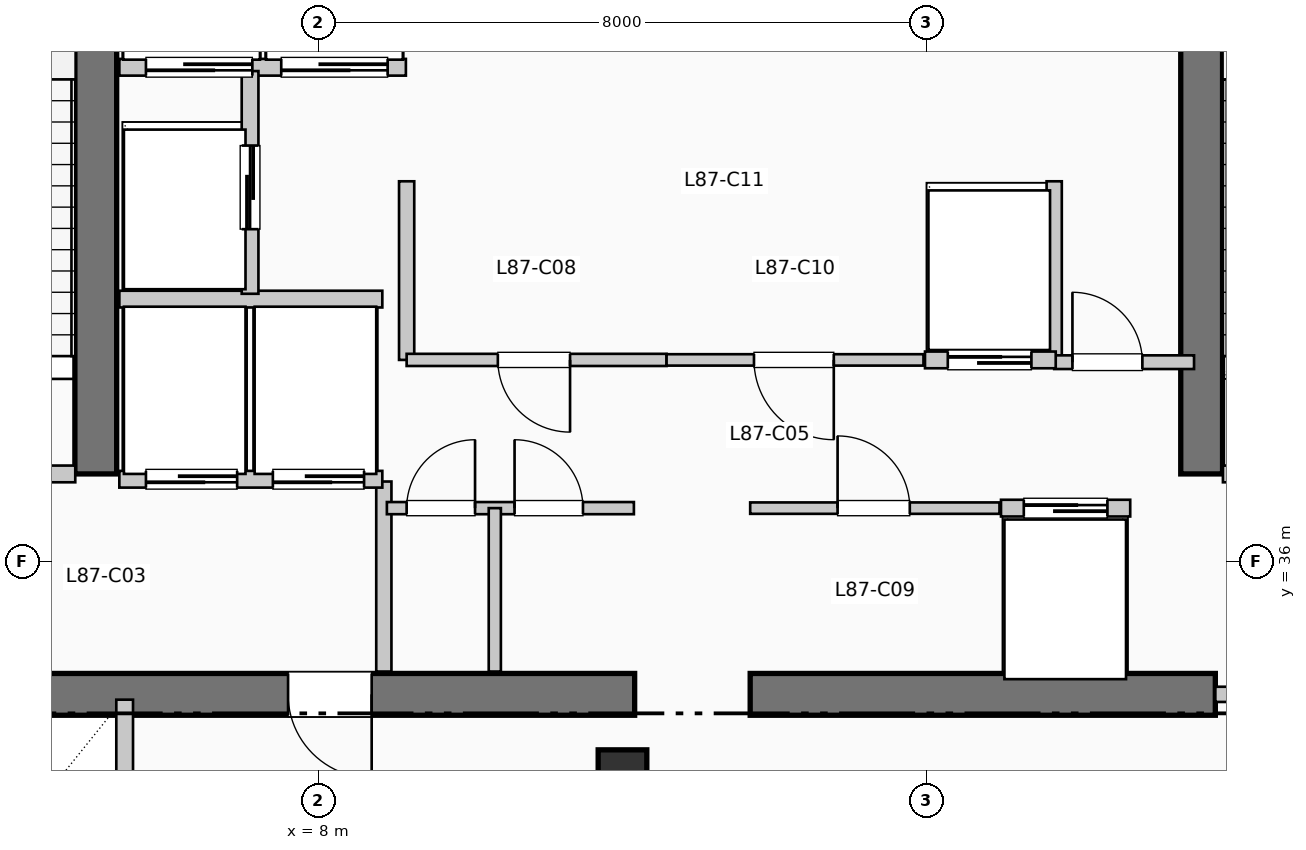
"""IFC4 building model, lengths in metres.
Left out: names, types, materials, properties, quantities, classifications, styles, units other than length and angle.
Written with IfcOpenShell. Run it as: python <this file> out.ifc"""

import sys

from ifc_helpers import new_model, si_unit, direction, frame, frame_2d, origin, origin_2d, place, context, subcontext, project, spatial, rectangle, extrude, element, fill, save


model = new_model("IFC4")
c1 = context("Model", 3, precision=1e-05, world=origin(), true_north=direction((0.0, 1.0)))
c2 = subcontext(c1, "Body", "Model", "MODEL_VIEW")
j1 = project(units=[si_unit("LENGTHUNIT", "METRE"), si_unit("PLANEANGLEUNIT", "RADIAN")], contexts=[c1])
p1 = place(None, origin())
s1 = spatial("IfcSite", under=j1, at=p1, CompositionType="ELEMENT")
p2 = place(p1, origin())
s2 = spatial("IfcBuilding", under=s1, at=p2, CompositionType="ELEMENT")
p3 = place(p2, frame((0.0, 0.0, 356.73)))
s3 = spatial("IfcBuildingStorey", under=s2, at=p3, CompositionType="ELEMENT", Elevation=356.73)
p4 = place(p3, frame((1.45, 34.25, 0.0), z_axis=(0.0, 0.0, 1.0), x_axis=(1.0, 0.0, 0.0)))
e1 = element("IfcWall", 1, at=p4, inside=s3, PredefinedType="SHEAR", context=c2, shape_type="SweptSolid", body=[
    extrude(rectangle(XDim=10.71, YDim=0.55, at=frame_2d((5.355, 0.0))), origin(), (0.0, 0.0, 1.0), 4.62),
])
p5 = place(p4, frame((7.25, 0.0, 0.0), z_axis=(0.0, 0.0, 1.0), x_axis=(-1.0, 0.0, 0.0)))
e2 = element("IfcOpeningElement", 2, at=p5, cuts=e1, PredefinedType="OPENING", context=c2, shape_type="SweptSolid", body=[
    extrude(rectangle(XDim=1.1, YDim=2.15, at=frame_2d((0.55, 1.075))), frame((0.0, 0.285, 0.0), z_axis=(0.0, -1.0, 0.0), x_axis=(1.0, 0.0, 0.0)), (0.0, 0.0, 1.0), 0.57),
])
p6 = place(p3, frame((13.68, 34.25, 0.0), z_axis=(0.0, 0.0, 1.0), x_axis=(1.0, 0.0, 0.0)))
e3 = element("IfcWall", 3, at=p6, inside=s3, PredefinedType="SHEAR", context=c2, shape_type="SweptSolid", body=[
    extrude(rectangle(XDim=6.12, YDim=0.55, at=frame_2d((3.06, 0.0))), origin(), (0.0, 0.0, 1.0), 4.62),
])
for number, where, z_axis, x_axis in (
    (4, (5.07, 37.15, 0.0), (0.0, 0.0, 1.0), (0.0, 1.0, 0.0)),
    (5, (19.62, 37.15, 0.0), (0.0, 0.0, 1.0), (0.0, 1.0, 0.0)),
):
    element("IfcWall", number, at=place(p3, frame(where, z_axis=z_axis, x_axis=x_axis)), inside=s3, PredefinedType="SHEAR", context=c2, shape_type="SweptSolid", body=[
        extrude(rectangle(XDim=7.89, YDim=0.55, at=frame_2d((3.945, 0.0))), origin(), (0.0, 0.0, 1.0), 4.62),
    ])
p7 = place(p3, frame((12.0, 33.2, 0.0), z_axis=(0.0, 0.0, 1.0), x_axis=(1.0, 0.0, 0.0)))
e6 = element("IfcColumn", 6, at=p7, inside=s3, PredefinedType="COLUMN", context=c2, shape_type="SweptSolid", body=[
    extrude(rectangle(XDim=0.64, YDim=0.64, at=origin_2d()), origin(), (0.0, 0.0, 1.0), 4.62),
])
p8 = place(p3, frame((1.65, 37.15, 0.0), z_axis=(0.0, 0.0, 1.0), x_axis=(1.0, 0.0, 0.0)))
e7 = element("IfcWall", 7, at=p8, inside=s3, PredefinedType="PARTITIONING", context=c2, shape_type="SweptSolid", body=[
    extrude(rectangle(XDim=3.15, YDim=0.22, at=frame_2d((1.575, 0.0))), origin(), (0.0, 0.0, 1.0), 4.37),
])
p9 = place(p8, frame((2.05, 0.0, 0.0), z_axis=(0.0, 0.0, 1.0), x_axis=(-1.0, 0.0, 0.0)))
e8 = element("IfcOpeningElement", 8, at=p9, cuts=e7, PredefinedType="OPENING", context=c2, shape_type="SweptSolid", body=[
    extrude(rectangle(XDim=1.05, YDim=2.15, at=frame_2d((0.525, 1.075))), frame((0.0, 0.12, 0.0), z_axis=(0.0, -1.0, 0.0), x_axis=(1.0, 0.0, 0.0)), (0.0, 0.0, 1.0), 0.24),
])
p10 = place(p3, frame((8.86, 34.55, 0.0), z_axis=(0.0, 0.0, 1.0), x_axis=(0.0, 1.0, 0.0)))
e9 = element("IfcWall", 9, at=p10, inside=s3, PredefinedType="PARTITIONING", context=c2, shape_type="SweptSolid", body=[
    extrude(rectangle(XDim=2.5, YDim=0.2, at=frame_2d((1.25, 0.0))), origin(), (0.0, 0.0, 1.0), 4.37),
])
p11 = place(p3, frame((19.9, 37.15, 0.0), z_axis=(0.0, 0.0, 1.0), x_axis=(1.0, 0.0, 0.0)))
e10 = element("IfcWall", 10, at=p11, inside=s3, PredefinedType="PARTITIONING", context=c2, shape_type="SweptSolid", body=[
    extrude(rectangle(XDim=3.15, YDim=0.22, at=frame_2d((1.575, 0.0))), origin(), (0.0, 0.0, 1.0), 4.37),
])
p12 = place(p11, frame((2.05, 0.0, 0.0), z_axis=(0.0, 0.0, 1.0), x_axis=(-1.0, 0.0, 0.0)))
e11 = element("IfcOpeningElement", 11, at=p12, cuts=e10, PredefinedType="OPENING", context=c2, shape_type="SweptSolid", body=[
    extrude(rectangle(XDim=1.05, YDim=2.15, at=frame_2d((0.525, 1.075))), frame((0.0, 0.12, 0.0), z_axis=(0.0, -1.0, 0.0), x_axis=(1.0, 0.0, 0.0)), (0.0, 0.0, 1.0), 0.24),
])
p13 = place(p3, frame((19.8, 34.25, 0.0), z_axis=(0.0, 0.0, 1.0), x_axis=(1.0, 0.0, 0.0)))
e12 = element("IfcWall", 12, at=p13, inside=s3, PredefinedType="PARTITIONING", context=c2, shape_type="SweptSolid", body=[
    extrude(rectangle(XDim=3.25, YDim=0.2, at=frame_2d((1.625, 0.0))), origin(), (0.0, 0.0, 1.0), 4.37),
])
p14 = place(p13, frame((2.15, 0.0, 0.0), z_axis=(0.0, 0.0, 1.0), x_axis=(-1.0, 0.0, 0.0)))
e13 = element("IfcOpeningElement", 13, at=p14, cuts=e12, PredefinedType="OPENING", context=c2, shape_type="SweptSolid", body=[
    extrude(rectangle(XDim=1.1, YDim=2.15, at=frame_2d((0.55, 1.075))), frame((0.0, 0.11, 0.0), z_axis=(0.0, -1.0, 0.0), x_axis=(1.0, 0.0, 0.0)), (0.0, 0.0, 1.0), 0.22),
])
p15 = place(p3, frame((5.38, 37.08, 0.0), z_axis=(0.0, 0.0, 1.0), x_axis=(1.0, 0.0, 0.0)))
e14 = element("IfcWall", 14, at=p15, inside=s3, PredefinedType="PARTITIONING", context=c2, shape_type="SweptSolid", body=[
    extrude(rectangle(XDim=3.46, YDim=0.22, at=frame_2d((1.73, 0.0))), origin(), (0.0, 0.0, 1.0), 4.37),
])
p16 = place(p15, frame((1.55, 0.0, 0.0), z_axis=(0.0, 0.0, 1.0), x_axis=(-1.0, 0.0, 0.0)))
e15 = element("IfcOpeningElement", 15, at=p16, cuts=e14, PredefinedType="OPENING", context=c2, shape_type="SweptSolid", body=[
    extrude(rectangle(XDim=1.2, YDim=2.2, at=frame_2d((0.6, 1.1))), frame((0.0, 0.12, 0.0), z_axis=(0.0, -1.0, 0.0), x_axis=(1.0, 0.0, 0.0)), (0.0, 0.0, 1.0), 0.24),
])
p17 = place(p15, frame((3.22, 0.0, 0.0), z_axis=(0.0, 0.0, 1.0), x_axis=(-1.0, 0.0, 0.0)))
e16 = element("IfcOpeningElement", 16, at=p17, cuts=e14, PredefinedType="OPENING", context=c2, shape_type="SweptSolid", body=[
    extrude(rectangle(XDim=1.2, YDim=2.2, at=frame_2d((0.6, 1.1))), frame((0.0, 0.12, 0.0), z_axis=(0.0, -1.0, 0.0), x_axis=(1.0, 0.0, 0.0)), (0.0, 0.0, 1.0), 0.24),
])
p18 = place(p3, frame((5.38, 39.45, 0.0), z_axis=(0.0, 0.0, 1.0), x_axis=(1.0, 0.0, 0.0)))
e17 = element("IfcWall", 17, at=p18, inside=s3, PredefinedType="PARTITIONING", context=c2, shape_type="SweptSolid", body=[
    extrude(rectangle(XDim=3.46, YDim=0.22, at=frame_2d((1.73, 0.0))), origin(), (0.0, 0.0, 1.0), 4.37),
])
p19 = place(p3, frame((5.38, 42.5, 0.0), z_axis=(0.0, 0.0, 1.0), x_axis=(1.0, 0.0, 0.0)))
e18 = element("IfcWall", 18, at=p19, inside=s3, PredefinedType="PARTITIONING", context=c2, shape_type="SweptSolid", body=[
    extrude(rectangle(XDim=3.77, YDim=0.22, at=frame_2d((1.885, 0.0))), origin(), (0.0, 0.0, 1.0), 4.37),
])
p20 = place(p19, frame((1.75, 0.0, 0.0), z_axis=(0.0, 0.0, 1.0), x_axis=(-1.0, 0.0, 0.0)))
e19 = element("IfcOpeningElement", 19, at=p20, cuts=e18, PredefinedType="OPENING", context=c2, shape_type="SweptSolid", body=[
    extrude(rectangle(XDim=1.4, YDim=2.2, at=frame_2d((0.7, 1.1))), frame((0.0, 0.12, 0.0), z_axis=(0.0, -1.0, 0.0), x_axis=(1.0, 0.0, 0.0)), (0.0, 0.0, 1.0), 0.24),
])
p21 = place(p19, frame((3.53, 0.0, 0.0), z_axis=(0.0, 0.0, 1.0), x_axis=(-1.0, 0.0, 0.0)))
e20 = element("IfcOpeningElement", 20, at=p21, cuts=e18, PredefinedType="OPENING", context=c2, shape_type="SweptSolid", body=[
    extrude(rectangle(XDim=1.4, YDim=2.2, at=frame_2d((0.7, 1.1))), frame((0.0, 0.12, 0.0), z_axis=(0.0, -1.0, 0.0), x_axis=(1.0, 0.0, 0.0)), (0.0, 0.0, 1.0), 0.24),
])
p22 = place(p3, frame((7.1, 39.52, 0.0), z_axis=(0.0, 0.0, 1.0), x_axis=(0.0, 1.0, 0.0)))
e21 = element("IfcWall", 21, at=p22, inside=s3, PredefinedType="PARTITIONING", context=c2, shape_type="SweptSolid", body=[
    extrude(rectangle(XDim=2.93, YDim=0.22, at=frame_2d((1.465, 0.0))), origin(), (0.0, 0.0, 1.0), 4.37),
])
p23 = place(p22, frame((0.85, 0.0, 0.0)))
e22 = element("IfcOpeningElement", 22, at=p23, cuts=e21, PredefinedType="OPENING", context=c2, shape_type="SweptSolid", body=[
    extrude(rectangle(XDim=1.1, YDim=2.2, at=frame_2d((0.55, 1.1))), frame((0.0, 0.12, 0.0), z_axis=(0.0, -1.0, 0.0), x_axis=(1.0, 0.0, 0.0)), (0.0, 0.0, 1.0), 0.24),
])
p24 = place(p3, frame((5.45, 31.8, 0.0), z_axis=(0.0, 0.0, 1.0), x_axis=(0.0, 1.0, 0.0)))
e23 = element("IfcWall", 23, at=p24, inside=s3, PredefinedType="PARTITIONING", context=c2, shape_type="SweptSolid", body=[
    extrude(rectangle(XDim=2.38, YDim=0.22, at=frame_2d((1.19, 0.0))), origin(), (0.0, 0.0, 1.0), 4.37),
])
for number, where, z_axis, x_axis in (
    (24, (9.16, 38.65, 0.0), (0.0, 0.0, 1.0), (0.0, 1.0, 0.0)),
    (25, (17.68, 38.65, 0.0), (0.0, 0.0, 1.0), (0.0, 1.0, 0.0)),
):
    element("IfcWall", number, at=place(p3, frame(where, z_axis=z_axis, x_axis=x_axis)), inside=s3, PredefinedType="PARTITIONING", context=c2, shape_type="SweptSolid", body=[
        extrude(rectangle(XDim=2.35, YDim=0.2, at=frame_2d((1.175, 0.0))), origin(), (0.0, 0.0, 1.0), 4.37),
    ])
p25 = place(p3, frame((17.68, 38.62, 0.0), z_axis=(0.0, 0.0, 1.0), x_axis=(1.0, 0.0, 0.0)))
e26 = element("IfcWall", 26, at=p25, inside=s3, PredefinedType="PARTITIONING", context=c2, shape_type="SweptSolid", body=[
    extrude(rectangle(XDim=1.84, YDim=0.18, at=frame_2d((0.92, 0.0))), origin(), (0.0, 0.0, 1.0), 4.37),
])
p26 = place(p25, frame((0.24, 0.0, 0.0)))
e27 = element("IfcOpeningElement", 27, at=p26, cuts=e26, PredefinedType="OPENING", context=c2, shape_type="SweptSolid", body=[
    extrude(rectangle(XDim=0.92, YDim=2.1, at=frame_2d((0.46, 1.05))), frame((0.0, 0.1, 0.0), z_axis=(0.0, -1.0, 0.0), x_axis=(1.0, 0.0, 0.0)), (0.0, 0.0, 1.0), 0.2),
])
p27 = place(p3, frame((8.9, 36.7, 0.0), z_axis=(0.0, 0.0, 1.0), x_axis=(1.0, 0.0, 0.0)))
e28 = element("IfcWall", 28, at=p27, inside=s3, PredefinedType="PARTITIONING", context=c2, shape_type="SweptSolid", body=[
    extrude(rectangle(XDim=3.25, YDim=0.16, at=frame_2d((1.625, 0.0))), origin(), (0.0, 0.0, 1.0), 4.37),
])
p28 = place(p27, frame((0.26, 0.0, 0.0)))
e29 = element("IfcOpeningElement", 29, at=p28, cuts=e28, PredefinedType="OPENING", context=c2, shape_type="SweptSolid", body=[
    extrude(rectangle(XDim=0.9, YDim=2.15, at=frame_2d((0.45, 1.075))), frame((0.0, 0.09, 0.0), z_axis=(0.0, -1.0, 0.0), x_axis=(1.0, 0.0, 0.0)), (0.0, 0.0, 1.0), 0.18),
])
p29 = place(p27, frame((1.68, 0.0, 0.0)))
e30 = element("IfcOpeningElement", 30, at=p29, cuts=e28, PredefinedType="OPENING", context=c2, shape_type="SweptSolid", body=[
    extrude(rectangle(XDim=0.9, YDim=2.15, at=frame_2d((0.45, 1.075))), frame((0.0, 0.09, 0.0), z_axis=(0.0, -1.0, 0.0), x_axis=(1.0, 0.0, 0.0)), (0.0, 0.0, 1.0), 0.18),
])
p30 = place(p3, frame((10.32, 34.55, 0.0), z_axis=(0.0, 0.0, 1.0), x_axis=(0.0, 1.0, 0.0)))
e31 = element("IfcWall", 31, at=p30, inside=s3, PredefinedType="PARTITIONING", context=c2, shape_type="SweptSolid", body=[
    extrude(rectangle(XDim=2.15, YDim=0.16, at=frame_2d((1.075, 0.0))), origin(), (0.0, 0.0, 1.0), 4.37),
])
p31 = place(p3, frame((9.16, 38.65, 0.0), z_axis=(0.0, 0.0, 1.0), x_axis=(1.0, 0.0, 0.0)))
e32 = element("IfcWall", 32, at=p31, inside=s3, PredefinedType="PARTITIONING", context=c2, shape_type="SweptSolid", body=[
    extrude(rectangle(XDim=3.42, YDim=0.16, at=frame_2d((1.71, 0.0))), origin(), (0.0, 0.0, 1.0), 4.37),
])
p32 = place(p31, frame((2.15, 0.0, 0.0), z_axis=(0.0, 0.0, 1.0), x_axis=(-1.0, 0.0, 0.0)))
e33 = element("IfcOpeningElement", 33, at=p32, cuts=e32, PredefinedType="OPENING", context=c2, shape_type="SweptSolid", body=[
    extrude(rectangle(XDim=0.95, YDim=2.15, at=frame_2d((0.475, 1.075))), frame((0.0, 0.09, 0.0), z_axis=(0.0, -1.0, 0.0), x_axis=(1.0, 0.0, 0.0)), (0.0, 0.0, 1.0), 0.18),
])
p33 = place(p3, frame((13.68, 36.7, 0.0), z_axis=(0.0, 0.0, 1.0), x_axis=(1.0, 0.0, 0.0)))
e34 = element("IfcWall", 34, at=p33, inside=s3, PredefinedType="PARTITIONING", context=c2, shape_type="SweptSolid", body=[
    extrude(rectangle(XDim=3.28, YDim=0.15, at=frame_2d((1.64, 0.0))), origin(), (0.0, 0.0, 1.0), 4.37),
])
p34 = place(p33, frame((1.15, 0.0, 0.0)))
e35 = element("IfcOpeningElement", 35, at=p34, cuts=e34, PredefinedType="OPENING", context=c2, shape_type="SweptSolid", body=[
    extrude(rectangle(XDim=0.95, YDim=2.15, at=frame_2d((0.475, 1.075))), frame((0.0, 0.085, 0.0), z_axis=(0.0, -1.0, 0.0), x_axis=(1.0, 0.0, 0.0)), (0.0, 0.0, 1.0), 0.17),
])
p35 = place(p3, frame((12.58, 38.65, 0.0), z_axis=(0.0, 0.0, 1.0), x_axis=(1.0, 0.0, 0.0)))
e36 = element("IfcWall", 36, at=p35, inside=s3, PredefinedType="PARTITIONING", context=c2, shape_type="SweptSolid", body=[
    extrude(rectangle(XDim=3.38, YDim=0.15, at=frame_2d((1.69, 0.0))), origin(), (0.0, 0.0, 1.0), 4.37),
])
p36 = place(p35, frame((2.2, 0.0, 0.0), z_axis=(0.0, 0.0, 1.0), x_axis=(-1.0, 0.0, 0.0)))
e37 = element("IfcOpeningElement", 37, at=p36, cuts=e36, PredefinedType="OPENING", context=c2, shape_type="SweptSolid", body=[
    extrude(rectangle(XDim=1.05, YDim=2.15, at=frame_2d((0.525, 1.075))), frame((0.0, 0.085, 0.0), z_axis=(0.0, -1.0, 0.0), x_axis=(1.0, 0.0, 0.0)), (0.0, 0.0, 1.0), 0.17),
])
p37 = place(p3, frame((16.98, 36.7, 0.0), z_axis=(0.0, 0.0, 1.0), x_axis=(1.0, 0.0, 0.0)))
e38 = element("IfcWall", 38, at=p37, inside=s3, PredefinedType="PARTITIONING", context=c2, shape_type="SweptSolid", body=[
    extrude(rectangle(XDim=1.7, YDim=0.22, at=frame_2d((0.85, 0.0))), origin(), (0.0, 0.0, 1.0), 4.37),
])
p38 = place(p37, frame((0.3, 0.0, 0.0)))
e39 = element("IfcOpeningElement", 39, at=p38, cuts=e38, PredefinedType="OPENING", context=c2, shape_type="SweptSolid", body=[
    extrude(rectangle(XDim=1.1, YDim=2.2, at=frame_2d((0.55, 1.1))), frame((0.0, 0.12, 0.0), z_axis=(0.0, -1.0, 0.0), x_axis=(1.0, 0.0, 0.0)), (0.0, 0.0, 1.0), 0.24),
])
p39 = place(p3, frame((15.98, 38.65, 0.0), z_axis=(0.0, 0.0, 1.0), x_axis=(1.0, 0.0, 0.0)))
e40 = element("IfcWall", 40, at=p39, inside=s3, PredefinedType="PARTITIONING", context=c2, shape_type="SweptSolid", body=[
    extrude(rectangle(XDim=1.72, YDim=0.22, at=frame_2d((0.86, 0.0))), origin(), (0.0, 0.0, 1.0), 4.37),
])
p40 = place(p39, frame((0.3, 0.0, 0.0)))
e41 = element("IfcOpeningElement", 41, at=p40, cuts=e40, PredefinedType="OPENING", context=c2, shape_type="SweptSolid", body=[
    extrude(rectangle(XDim=1.1, YDim=2.2, at=frame_2d((0.55, 1.1))), frame((0.0, 0.12, 0.0), z_axis=(0.0, -1.0, 0.0), x_axis=(1.0, 0.0, 0.0)), (0.0, 0.0, 1.0), 0.24),
])
p41 = place(p5, origin())
e42 = element("IfcDoor", 42, at=p41, inside=s3, OperationType="SINGLE_SWING_RIGHT", PredefinedType="DOOR", context=c2, shape_type="SweptSolid", body=[
    extrude(rectangle(XDim=1.1, YDim=2.15, at=frame_2d((0.55, 1.075))), frame((0.0, 0.025, 0.0), z_axis=(0.0, -1.0, 0.0), x_axis=(1.0, 0.0, 0.0)), (0.0, 0.0, 1.0), 0.05),
])
fill(e2, e42)
p42 = place(p16, origin())
e43 = element("IfcDoor", 43, at=p42, inside=s3, OperationType="SLIDING_TO_RIGHT", PredefinedType="DOOR", context=c2, shape_type="SweptSolid", body=[
    extrude(rectangle(XDim=1.2, YDim=2.2, at=frame_2d((0.6, 1.1))), frame((0.0, 0.025, 0.0), z_axis=(0.0, -1.0, 0.0), x_axis=(1.0, 0.0, 0.0)), (0.0, 0.0, 1.0), 0.05),
])
fill(e15, e43)
p43 = place(p17, origin())
e44 = element("IfcDoor", 44, at=p43, inside=s3, OperationType="SLIDING_TO_RIGHT", PredefinedType="DOOR", context=c2, shape_type="SweptSolid", body=[
    extrude(rectangle(XDim=1.2, YDim=2.2, at=frame_2d((0.6, 1.1))), frame((0.0, 0.025, 0.0), z_axis=(0.0, -1.0, 0.0), x_axis=(1.0, 0.0, 0.0)), (0.0, 0.0, 1.0), 0.05),
])
fill(e16, e44)
p44 = place(p20, origin())
e45 = element("IfcDoor", 45, at=p44, inside=s3, OperationType="SLIDING_TO_LEFT", PredefinedType="DOOR", context=c2, shape_type="SweptSolid", body=[
    extrude(rectangle(XDim=1.4, YDim=2.2, at=frame_2d((0.7, 1.1))), frame((0.0, 0.025, 0.0), z_axis=(0.0, -1.0, 0.0), x_axis=(1.0, 0.0, 0.0)), (0.0, 0.0, 1.0), 0.05),
])
fill(e19, e45)
p45 = place(p21, origin())
e46 = element("IfcDoor", 46, at=p45, inside=s3, OperationType="SLIDING_TO_LEFT", PredefinedType="DOOR", context=c2, shape_type="SweptSolid", body=[
    extrude(rectangle(XDim=1.4, YDim=2.2, at=frame_2d((0.7, 1.1))), frame((0.0, 0.025, 0.0), z_axis=(0.0, -1.0, 0.0), x_axis=(1.0, 0.0, 0.0)), (0.0, 0.0, 1.0), 0.05),
])
fill(e20, e46)
p46 = place(p23, origin())
e47 = element("IfcDoor", 47, at=p46, inside=s3, OperationType="SLIDING_TO_LEFT", PredefinedType="DOOR", context=c2, shape_type="SweptSolid", body=[
    extrude(rectangle(XDim=1.1, YDim=2.2, at=frame_2d((0.55, 1.1))), frame((0.0, 0.025, 0.0), z_axis=(0.0, -1.0, 0.0), x_axis=(1.0, 0.0, 0.0)), (0.0, 0.0, 1.0), 0.05),
])
fill(e22, e47)
p47 = place(p26, origin())
e48 = element("IfcDoor", 48, at=p47, inside=s3, OperationType="SINGLE_SWING_LEFT", PredefinedType="DOOR", context=c2, shape_type="SweptSolid", body=[
    extrude(rectangle(XDim=0.92, YDim=2.1, at=frame_2d((0.46, 1.05))), frame((0.0, 0.025, 0.0), z_axis=(0.0, -1.0, 0.0), x_axis=(1.0, 0.0, 0.0)), (0.0, 0.0, 1.0), 0.05),
])
fill(e27, e48)
p48 = place(p28, origin())
e49 = element("IfcDoor", 49, at=p48, inside=s3, OperationType="SINGLE_SWING_RIGHT", PredefinedType="DOOR", context=c2, shape_type="SweptSolid", body=[
    extrude(rectangle(XDim=0.9, YDim=2.15, at=frame_2d((0.45, 1.075))), frame((0.0, 0.025, 0.0), z_axis=(0.0, -1.0, 0.0), x_axis=(1.0, 0.0, 0.0)), (0.0, 0.0, 1.0), 0.05),
])
fill(e29, e49)
p49 = place(p29, origin())
e50 = element("IfcDoor", 50, at=p49, inside=s3, OperationType="SINGLE_SWING_LEFT", PredefinedType="DOOR", context=c2, shape_type="SweptSolid", body=[
    extrude(rectangle(XDim=0.9, YDim=2.15, at=frame_2d((0.45, 1.075))), frame((0.0, 0.025, 0.0), z_axis=(0.0, -1.0, 0.0), x_axis=(1.0, 0.0, 0.0)), (0.0, 0.0, 1.0), 0.05),
])
fill(e30, e50)
p50 = place(p32, origin())
e51 = element("IfcDoor", 51, at=p50, inside=s3, OperationType="SINGLE_SWING_RIGHT", PredefinedType="DOOR", context=c2, shape_type="SweptSolid", body=[
    extrude(rectangle(XDim=0.95, YDim=2.15, at=frame_2d((0.475, 1.075))), frame((0.0, 0.025, 0.0), z_axis=(0.0, -1.0, 0.0), x_axis=(1.0, 0.0, 0.0)), (0.0, 0.0, 1.0), 0.05),
])
fill(e33, e51)
p51 = place(p34, origin())
e52 = element("IfcDoor", 52, at=p51, inside=s3, OperationType="SINGLE_SWING_LEFT", PredefinedType="DOOR", context=c2, shape_type="SweptSolid", body=[
    extrude(rectangle(XDim=0.95, YDim=2.15, at=frame_2d((0.475, 1.075))), frame((0.0, 0.025, 0.0), z_axis=(0.0, -1.0, 0.0), x_axis=(1.0, 0.0, 0.0)), (0.0, 0.0, 1.0), 0.05),
])
fill(e35, e52)
p52 = place(p36, origin())
e53 = element("IfcDoor", 53, at=p52, inside=s3, OperationType="SINGLE_SWING_RIGHT", PredefinedType="DOOR", context=c2, shape_type="SweptSolid", body=[
    extrude(rectangle(XDim=1.05, YDim=2.15, at=frame_2d((0.525, 1.075))), frame((0.0, 0.025, 0.0), z_axis=(0.0, -1.0, 0.0), x_axis=(1.0, 0.0, 0.0)), (0.0, 0.0, 1.0), 0.05),
])
fill(e37, e53)
p53 = place(p38, origin())
e54 = element("IfcDoor", 54, at=p53, inside=s3, OperationType="SLIDING_TO_LEFT", PredefinedType="DOOR", context=c2, shape_type="SweptSolid", body=[
    extrude(rectangle(XDim=1.1, YDim=2.2, at=frame_2d((0.55, 1.1))), frame((0.0, 0.025, 0.0), z_axis=(0.0, -1.0, 0.0), x_axis=(1.0, 0.0, 0.0)), (0.0, 0.0, 1.0), 0.05),
])
fill(e39, e54)
p54 = place(p40, origin())
e55 = element("IfcDoor", 55, at=p54, inside=s3, OperationType="SLIDING_TO_LEFT", PredefinedType="DOOR", context=c2, shape_type="SweptSolid", body=[
    extrude(rectangle(XDim=1.1, YDim=2.2, at=frame_2d((0.55, 1.1))), frame((0.0, 0.025, 0.0), z_axis=(0.0, -1.0, 0.0), x_axis=(1.0, 0.0, 0.0)), (0.0, 0.0, 1.0), 0.05),
])
fill(e41, e55)
save(model, sys.argv[1])
